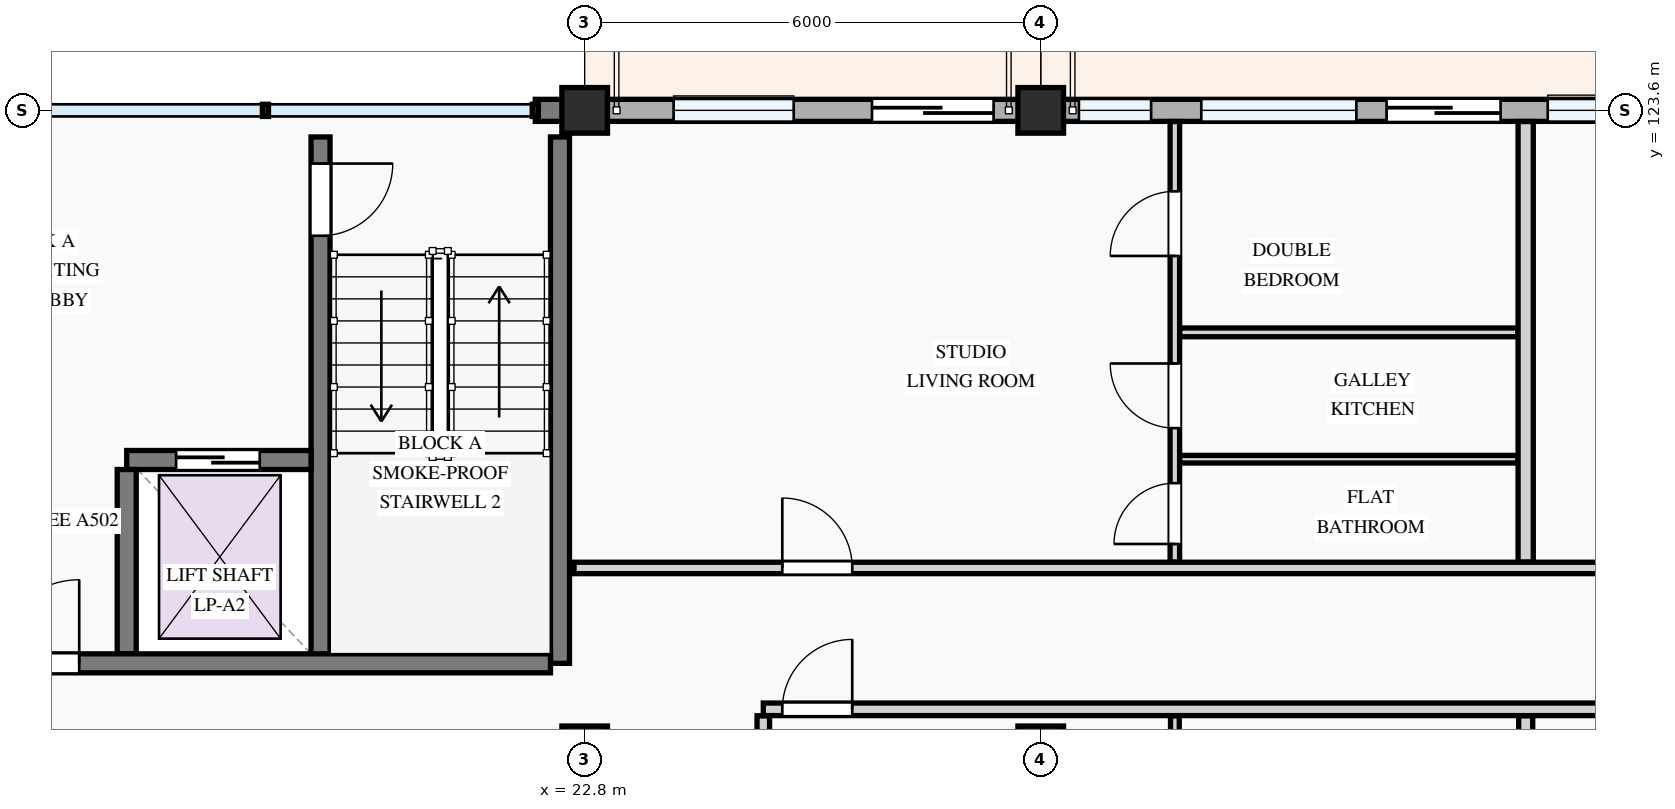
"""IFC4 building model, lengths in metres.
Left out: names, types, materials, properties, quantities, classifications, styles, units other than length and angle.
Written with IfcOpenShell. Run it as: python <this file> out.ifc"""

import sys

from ifc_helpers import new_model, si_unit, direction, frame, frame_2d, origin, origin_2d, place, context, subcontext, project, spatial, rectangle, extrude, element, fill, save


model = new_model("IFC4")
c1 = context("Model", 3, precision=1e-05, world=origin(), true_north=direction((0.0, 1.0)))
c2 = subcontext(c1, "Body", "Model", "MODEL_VIEW")
j1 = project(units=[si_unit("LENGTHUNIT", "METRE"), si_unit("PLANEANGLEUNIT", "RADIAN")], contexts=[c1])
p1 = place(None, origin())
s1 = spatial("IfcSite", under=j1, at=p1, CompositionType="ELEMENT")
p2 = place(p1, origin())
s2 = spatial("IfcBuilding", under=s1, at=p2, CompositionType="ELEMENT")
p3 = place(p2, frame((0.0, 0.0, 27.9)))
s3 = spatial("IfcBuildingStorey", under=s2, at=p3, CompositionType="ELEMENT", Elevation=27.9)
for number, where, z_axis, x_axis in (
    (1, (22.8, 115.2, 0.0), (0.0, 0.0, 1.0), (1.0, 0.0, 0.0)),
    (2, (22.8, 123.6, 0.0), (0.0, 0.0, 1.0), (1.0, 0.0, 0.0)),
    (3, (28.8, 115.2, 0.0), (0.0, 0.0, 1.0), (1.0, 0.0, 0.0)),
    (4, (28.8, 123.6, 0.0), (0.0, 0.0, 1.0), (1.0, 0.0, 0.0)),
):
    element("IfcColumn", number, at=place(p3, frame(where, z_axis=z_axis, x_axis=x_axis)), inside=s3, PredefinedType="COLUMN", context=c2, shape_type="SweptSolid", body=[
        extrude(rectangle(XDim=0.6, YDim=0.6, at=origin_2d()), origin(), (0.0, 0.0, 1.0), 3.3),
    ])
p4 = place(p3, frame((37.2, 123.6, 0.0), z_axis=(0.0, 0.0, 1.0), x_axis=(-1.0, 0.0, 0.0)))
e5 = element("IfcWall", 5, at=p4, inside=s3, PredefinedType="STANDARD", context=c2, shape_type="SweptSolid", body=[
    extrude(rectangle(XDim=8.4, YDim=0.29, at=frame_2d((4.2, 0.0))), origin(), (0.0, 0.0, 1.0), 2.345),
])
p5 = place(p4, frame((2.35, 0.0, 0.0)))
e6 = element("IfcOpeningElement", 6, at=p5, cuts=e5, PredefinedType="OPENING", context=c2, shape_type="SweptSolid", body=[
    extrude(rectangle(XDim=1.5, YDim=2.2, at=frame_2d((0.75, 1.1))), frame((0.0, 0.155, 0.0), z_axis=(0.0, -1.0, 0.0), x_axis=(1.0, 0.0, 0.0)), (0.0, 0.0, 1.0), 0.31),
])
p6 = place(p4, frame((0.48, 0.0, 0.78)))
e7 = element("IfcOpeningElement", 7, at=p6, cuts=e5, PredefinedType="OPENING", context=c2, shape_type="SweptSolid", body=[
    extrude(rectangle(XDim=1.25, YDim=1.3, at=frame_2d((0.625, 0.65))), frame((0.0, 0.155, 0.0), z_axis=(0.0, -1.0, 0.0), x_axis=(1.0, 0.0, 0.0)), (0.0, 0.0, 1.0), 0.31),
])
p7 = place(p4, frame((4.248, 0.0, 0.78)))
e8 = element("IfcOpeningElement", 8, at=p7, cuts=e5, PredefinedType="OPENING", context=c2, shape_type="SweptSolid", body=[
    extrude(rectangle(XDim=2.04, YDim=1.46, at=frame_2d((1.02, 0.73))), frame((0.0, 0.155, 0.0), z_axis=(0.0, -1.0, 0.0), x_axis=(1.0, 0.0, 0.0)), (0.0, 0.0, 1.0), 0.31),
])
p8 = place(p4, frame((6.948, 0.0, 0.78)))
e9 = element("IfcOpeningElement", 9, at=p8, cuts=e5, PredefinedType="OPENING", context=c2, shape_type="SweptSolid", body=[
    extrude(rectangle(XDim=0.95, YDim=1.15, at=frame_2d((0.475, 0.575))), frame((0.0, 0.155, 0.0), z_axis=(0.0, -1.0, 0.0), x_axis=(1.0, 0.0, 0.0)), (0.0, 0.0, 1.0), 0.31),
])
p9 = place(p3, frame((28.8, 123.6, 0.0), z_axis=(0.0, 0.0, 1.0), x_axis=(-1.0, 0.0, 0.0)))
e10 = element("IfcWall", 10, at=p9, inside=s3, PredefinedType="STANDARD", context=c2, shape_type="SweptSolid", body=[
    extrude(rectangle(XDim=6.0, YDim=0.29, at=frame_2d((3.0, 0.0))), origin(), (0.0, 0.0, 1.0), 2.445),
])
p10 = place(p9, frame((0.62, 0.0, 0.0)))
e11 = element("IfcOpeningElement", 11, at=p10, cuts=e10, PredefinedType="OPENING", context=c2, shape_type="SweptSolid", body=[
    extrude(rectangle(XDim=1.6, YDim=2.2, at=frame_2d((0.8, 1.1))), frame((0.0, 0.155, 0.0), z_axis=(0.0, -1.0, 0.0), x_axis=(1.0, 0.0, 0.0)), (0.0, 0.0, 1.0), 0.31),
])
p11 = place(p9, frame((3.25, 0.0, 0.78)))
e12 = element("IfcOpeningElement", 12, at=p11, cuts=e10, PredefinedType="OPENING", context=c2, shape_type="SweptSolid", body=[
    extrude(rectangle(XDim=1.58, YDim=1.48, at=frame_2d((0.79, 0.74))), frame((0.0, 0.155, 0.0), z_axis=(0.0, -1.0, 0.0), x_axis=(1.0, 0.0, 0.0)), (0.0, 0.0, 1.0), 0.31),
])
p12 = place(p3, frame((22.8, 123.6, 0.0), z_axis=(0.0, 0.0, 1.0), x_axis=(-1.0, 0.0, 0.0)))
e13 = element("IfcWall", 13, at=p12, inside=s3, PredefinedType="STANDARD", context=c2, shape_type="SweptSolid", body=[
    extrude(rectangle(XDim=0.65, YDim=0.29, at=frame_2d((0.325, 0.0))), origin(), (0.0, 0.0, 1.0), 3.04),
])
p13 = place(p3, frame((22.475, 123.25, 0.0), z_axis=(0.0, 0.0, 1.0), x_axis=(0.0, -1.0, 0.0)))
e14 = element("IfcWall", 14, at=p13, inside=s3, PredefinedType="SHEAR", context=c2, shape_type="SweptSolid", body=[
    extrude(rectangle(XDim=6.925, YDim=0.25, at=frame_2d((3.462, 0.0))), origin(), (0.0, 0.0, 1.0), 3.0),
])
p14 = place(p3, frame((19.325, 123.25, 0.0), z_axis=(0.0, 0.0, 1.0), x_axis=(0.0, -1.0, 0.0)))
e15 = element("IfcWall", 15, at=p14, inside=s3, PredefinedType="SHEAR", context=c2, shape_type="SweptSolid", body=[
    extrude(rectangle(XDim=6.925, YDim=0.25, at=frame_2d((3.462, 0.0))), origin(), (0.0, 0.0, 1.0), 3.0),
])
p15 = place(p14, frame((0.35, 0.0, 0.0)))
e16 = element("IfcOpeningElement", 16, at=p15, cuts=e15, PredefinedType="OPENING", context=c2, shape_type="SweptSolid", body=[
    extrude(rectangle(XDim=0.95, YDim=2.1, at=frame_2d((0.475, 1.05))), frame((0.0, 0.135, 0.0), z_axis=(0.0, -1.0, 0.0), x_axis=(1.0, 0.0, 0.0)), (0.0, 0.0, 1.0), 0.27),
])
p16 = place(p3, frame((16.775, 119.0, 0.0), z_axis=(0.0, 0.0, 1.0), x_axis=(1.0, 0.0, 0.0)))
e17 = element("IfcWall", 17, at=p16, inside=s3, PredefinedType="SHEAR", context=c2, shape_type="SweptSolid", body=[
    extrude(rectangle(XDim=2.425, YDim=0.25, at=frame_2d((1.212, 0.0))), origin(), (0.0, 0.0, 1.0), 3.0),
])
p17 = place(p16, frame((0.65, 0.0, 0.0)))
e18 = element("IfcOpeningElement", 18, at=p17, cuts=e17, PredefinedType="OPENING", context=c2, shape_type="SweptSolid", body=[
    extrude(rectangle(XDim=1.1, YDim=2.15, at=frame_2d((0.55, 1.075))), frame((0.0, 0.135, 0.0), z_axis=(0.0, -1.0, 0.0), x_axis=(1.0, 0.0, 0.0)), (0.0, 0.0, 1.0), 0.27),
])
p18 = place(p3, frame((16.775, 118.875, 0.0), z_axis=(0.0, 0.0, 1.0), x_axis=(0.0, -1.0, 0.0)))
e19 = element("IfcWall", 19, at=p18, inside=s3, PredefinedType="SHEAR", context=c2, shape_type="SweptSolid", body=[
    extrude(rectangle(XDim=2.425, YDim=0.25, at=frame_2d((1.212, 0.0))), origin(), (0.0, 0.0, 1.0), 3.0),
])
p19 = place(p3, frame((8.85, 116.325, 0.0), z_axis=(0.0, 0.0, 1.0), x_axis=(1.0, 0.0, 0.0)))
e20 = element("IfcWall", 20, at=p19, inside=s3, PredefinedType="SHEAR", context=c2, shape_type="SweptSolid", body=[
    extrude(rectangle(XDim=13.5, YDim=0.25, at=frame_2d((6.75, 0.0))), origin(), (0.0, 0.0, 1.0), 3.0),
])
p20 = place(p19, frame((6.2, 0.0, 0.0)))
e21 = element("IfcOpeningElement", 21, at=p20, cuts=e20, PredefinedType="OPENING", context=c2, shape_type="SweptSolid", body=[
    extrude(rectangle(XDim=1.1, YDim=2.15, at=frame_2d((0.55, 1.075))), frame((0.0, 0.135, 0.0), z_axis=(0.0, -1.0, 0.0), x_axis=(1.0, 0.0, 0.0)), (0.0, 0.0, 1.0), 0.27),
])
p21 = place(p3, frame((25.15, 109.347, 0.0), z_axis=(0.0, 0.0, 1.0), x_axis=(0.0, 1.0, 0.0)))
e22 = element("IfcWall", 22, at=p21, inside=s3, PredefinedType="PARTITIONING", context=c2, shape_type="SweptSolid", body=[
    extrude(rectangle(XDim=6.289, YDim=0.165, at=frame_2d((3.144, 0.0))), origin(), (0.0, 0.0, 1.0), 3.0),
])
p22 = place(p3, frame((30.565, 109.347, 0.0), z_axis=(0.0, 0.0, 1.0), x_axis=(0.0, 1.0, 0.0)))
e23 = element("IfcWall", 23, at=p22, inside=s3, PredefinedType="PARTITIONING", context=c2, shape_type="SweptSolid", body=[
    extrude(rectangle(XDim=6.289, YDim=0.115, at=frame_2d((3.144, 0.0))), origin(), (0.0, 0.0, 1.0), 3.0),
])
p23 = place(p22, frame((1.038, 0.0, 0.0)))
e24 = element("IfcOpeningElement", 24, at=p23, cuts=e23, PredefinedType="OPENING", context=c2, shape_type="SweptSolid", body=[
    extrude(rectangle(XDim=0.85, YDim=2.1, at=frame_2d((0.425, 1.05))), frame((0.0, 0.067, 0.0), z_axis=(0.0, -1.0, 0.0), x_axis=(1.0, 0.0, 0.0)), (0.0, 0.0, 1.0), 0.135),
])
p24 = place(p22, frame((3.493, 0.0, 0.0)))
e25 = element("IfcOpeningElement", 25, at=p24, cuts=e23, PredefinedType="OPENING", context=c2, shape_type="SweptSolid", body=[
    extrude(rectangle(XDim=0.85, YDim=2.1, at=frame_2d((0.425, 1.05))), frame((0.0, 0.067, 0.0), z_axis=(0.0, -1.0, 0.0), x_axis=(1.0, 0.0, 0.0)), (0.0, 0.0, 1.0), 0.135),
])
p25 = place(p22, frame((5.198, 0.0, 0.0)))
e26 = element("IfcOpeningElement", 26, at=p25, cuts=e23, PredefinedType="OPENING", context=c2, shape_type="SweptSolid", body=[
    extrude(rectangle(XDim=0.8, YDim=2.1, at=frame_2d((0.4, 1.05))), frame((0.0, 0.067, 0.0), z_axis=(0.0, -1.0, 0.0), x_axis=(1.0, 0.0, 0.0)), (0.0, 0.0, 1.0), 0.135),
])
p26 = place(p3, frame((30.564, 117.657, 0.0), z_axis=(0.0, 0.0, 1.0), x_axis=(0.0, 1.0, 0.0)))
e27 = element("IfcWall", 27, at=p26, inside=s3, PredefinedType="PARTITIONING", context=c2, shape_type="SweptSolid", body=[
    extrude(rectangle(XDim=5.796, YDim=0.125, at=frame_2d((2.898, 0.0))), origin(), (0.0, 0.0, 1.0), 3.0),
])
p27 = place(p26, frame((0.238, 0.0, 0.0)))
e28 = element("IfcOpeningElement", 28, at=p27, cuts=e27, PredefinedType="OPENING", context=c2, shape_type="SweptSolid", body=[
    extrude(rectangle(XDim=0.8, YDim=2.1, at=frame_2d((0.4, 1.05))), frame((0.0, 0.073, 0.0), z_axis=(0.0, -1.0, 0.0), x_axis=(1.0, 0.0, 0.0)), (0.0, 0.0, 1.0), 0.145),
])
p28 = place(p26, frame((1.763, 0.0, 0.0)))
e29 = element("IfcOpeningElement", 29, at=p28, cuts=e27, PredefinedType="OPENING", context=c2, shape_type="SweptSolid", body=[
    extrude(rectangle(XDim=0.85, YDim=2.1, at=frame_2d((0.425, 1.05))), frame((0.0, 0.073, 0.0), z_axis=(0.0, -1.0, 0.0), x_axis=(1.0, 0.0, 0.0)), (0.0, 0.0, 1.0), 0.145),
])
p29 = place(p26, frame((4.028, 0.0, 0.0)))
e30 = element("IfcOpeningElement", 30, at=p29, cuts=e27, PredefinedType="OPENING", context=c2, shape_type="SweptSolid", body=[
    extrude(rectangle(XDim=0.85, YDim=2.1, at=frame_2d((0.425, 1.05))), frame((0.0, 0.073, 0.0), z_axis=(0.0, -1.0, 0.0), x_axis=(1.0, 0.0, 0.0)), (0.0, 0.0, 1.0), 0.145),
])
p30 = place(p3, frame((30.629, 120.679, 0.0), z_axis=(0.0, 0.0, 1.0), x_axis=(1.0, 0.0, 0.0)))
e31 = element("IfcWall", 31, at=p30, inside=s3, PredefinedType="PARTITIONING", context=c2, shape_type="SweptSolid", body=[
    extrude(rectangle(XDim=4.449, YDim=0.115, at=frame_2d((2.225, 0.0))), origin(), (0.0, 0.0, 1.0), 3.0),
])
p31 = place(p3, frame((30.629, 119.01, 0.0), z_axis=(0.0, 0.0, 1.0), x_axis=(1.0, 0.0, 0.0)))
e32 = element("IfcWall", 32, at=p31, inside=s3, PredefinedType="PARTITIONING", context=c2, shape_type="SweptSolid", body=[
    extrude(rectangle(XDim=4.449, YDim=0.1, at=frame_2d((2.225, 0.0))), origin(), (0.0, 0.0, 1.0), 3.0),
])
p32 = place(p3, frame((35.18, 109.347, 0.0), z_axis=(0.0, 0.0, 1.0), x_axis=(0.0, 1.0, 0.0)))
e33 = element("IfcWall", 33, at=p32, inside=s3, PredefinedType="PARTITIONING", context=c2, shape_type="SweptSolid", body=[
    extrude(rectangle(XDim=6.289, YDim=0.185, at=frame_2d((3.144, 0.0))), origin(), (0.0, 0.0, 1.0), 3.0),
])
p33 = place(p3, frame((35.18, 117.657, 0.0), z_axis=(0.0, 0.0, 1.0), x_axis=(0.0, 1.0, 0.0)))
e34 = element("IfcWall", 34, at=p33, inside=s3, PredefinedType="PARTITIONING", context=c2, shape_type="SweptSolid", body=[
    extrude(rectangle(XDim=5.796, YDim=0.2, at=frame_2d((2.898, 0.0))), origin(), (0.0, 0.0, 1.0), 3.0),
])
p34 = place(p3, frame((25.15, 115.72, 0.0), z_axis=(0.0, 0.0, 1.0), x_axis=(1.0, 0.0, 0.0)))
e35 = element("IfcWall", 35, at=p34, inside=s3, PredefinedType="PARTITIONING", context=c2, shape_type="SweptSolid", body=[
    extrude(rectangle(XDim=26.303, YDim=0.165, at=frame_2d((13.151, 0.0))), origin(), (0.0, 0.0, 1.0), 3.0),
])
p35 = place(p34, frame((0.25, 0.0, 0.0)))
e36 = element("IfcOpeningElement", 36, at=p35, cuts=e35, PredefinedType="OPENING", context=c2, shape_type="SweptSolid", body=[
    extrude(rectangle(XDim=0.92, YDim=2.1, at=frame_2d((0.46, 1.05))), frame((0.0, 0.093, 0.0), z_axis=(0.0, -1.0, 0.0), x_axis=(1.0, 0.0, 0.0)), (0.0, 0.0, 1.0), 0.185),
])
p36 = place(p34, frame((13.72, 0.0, 0.0)))
e37 = element("IfcOpeningElement", 37, at=p36, cuts=e35, PredefinedType="OPENING", context=c2, shape_type="SweptSolid", body=[
    extrude(rectangle(XDim=0.92, YDim=2.1, at=frame_2d((0.46, 1.05))), frame((0.0, 0.093, 0.0), z_axis=(0.0, -1.0, 0.0), x_axis=(1.0, 0.0, 0.0)), (0.0, 0.0, 1.0), 0.185),
])
p37 = place(p34, frame((21.786, 0.0, 0.0)))
e38 = element("IfcOpeningElement", 38, at=p37, cuts=e35, PredefinedType="OPENING", context=c2, shape_type="SweptSolid", body=[
    extrude(rectangle(XDim=0.96, YDim=2.12, at=frame_2d((0.48, 1.06))), frame((0.0, 0.093, 0.0), z_axis=(0.0, -1.0, 0.0), x_axis=(1.0, 0.0, 0.0)), (0.0, 0.0, 1.0), 0.185),
])
p38 = place(p3, frame((22.66, 117.58, 0.0), z_axis=(0.0, 0.0, 1.0), x_axis=(1.0, 0.0, 0.0)))
e39 = element("IfcWall", 39, at=p38, inside=s3, PredefinedType="PARTITIONING", context=c2, shape_type="SweptSolid", body=[
    extrude(rectangle(XDim=28.793, YDim=0.15, at=frame_2d((14.396, 0.0))), origin(), (0.0, 0.0, 1.0), 3.0),
])
p39 = place(p38, frame((2.74, 0.0, 0.0)))
e40 = element("IfcOpeningElement", 40, at=p39, cuts=e39, PredefinedType="OPENING", context=c2, shape_type="SweptSolid", body=[
    extrude(rectangle(XDim=0.92, YDim=2.1, at=frame_2d((0.46, 1.05))), frame((0.0, 0.085, 0.0), z_axis=(0.0, -1.0, 0.0), x_axis=(1.0, 0.0, 0.0)), (0.0, 0.0, 1.0), 0.17),
])
p40 = place(p38, frame((16.014, 0.0, 0.0)))
e41 = element("IfcOpeningElement", 41, at=p40, cuts=e39, PredefinedType="OPENING", context=c2, shape_type="SweptSolid", body=[
    extrude(rectangle(XDim=0.92, YDim=2.1, at=frame_2d((0.46, 1.05))), frame((0.0, 0.085, 0.0), z_axis=(0.0, -1.0, 0.0), x_axis=(1.0, 0.0, 0.0)), (0.0, 0.0, 1.0), 0.17),
])
p41 = place(p38, frame((24.259, 0.0, 0.0)))
e42 = element("IfcOpeningElement", 42, at=p41, cuts=e39, PredefinedType="OPENING", context=c2, shape_type="SweptSolid", body=[
    extrude(rectangle(XDim=0.92, YDim=2.1, at=frame_2d((0.46, 1.05))), frame((0.0, 0.085, 0.0), z_axis=(0.0, -1.0, 0.0), x_axis=(1.0, 0.0, 0.0)), (0.0, 0.0, 1.0), 0.17),
])
p42 = place(p5, frame((1.5, 0.0, 0.0), z_axis=(0.0, 0.0, 1.0), x_axis=(-1.0, 0.0, 0.0)))
e43 = element("IfcDoor", 43, at=p42, inside=s3, OperationType="SLIDING_TO_RIGHT", PredefinedType="DOOR", context=c2, shape_type="SweptSolid", body=[
    extrude(rectangle(XDim=1.5, YDim=2.2, at=frame_2d((0.75, 1.1))), frame((0.0, 0.025, 0.0), z_axis=(0.0, -1.0, 0.0), x_axis=(1.0, 0.0, 0.0)), (0.0, 0.0, 1.0), 0.05),
])
fill(e6, e43)
p43 = place(p6, origin())
e44 = element("IfcWindow", 44, at=p43, inside=s3, PartitioningType="SINGLE_PANEL", PredefinedType="WINDOW", context=c2, shape_type="SweptSolid", body=[
    extrude(rectangle(XDim=1.25, YDim=1.3, at=frame_2d((0.625, 0.65))), frame((0.0, 0.03, 0.0), z_axis=(0.0, -1.0, 0.0), x_axis=(1.0, 0.0, 0.0)), (0.0, 0.0, 1.0), 0.06),
])
fill(e7, e44)
p44 = place(p7, origin())
e45 = element("IfcWindow", 45, at=p44, inside=s3, PartitioningType="DOUBLE_PANEL_VERTICAL", PredefinedType="WINDOW", context=c2, shape_type="SweptSolid", body=[
    extrude(rectangle(XDim=2.04, YDim=1.46, at=frame_2d((1.02, 0.73))), frame((0.0, 0.03, 0.0), z_axis=(0.0, -1.0, 0.0), x_axis=(1.0, 0.0, 0.0)), (0.0, 0.0, 1.0), 0.06),
])
fill(e8, e45)
p45 = place(p8, origin())
e46 = element("IfcWindow", 46, at=p45, inside=s3, PartitioningType="SINGLE_PANEL", PredefinedType="WINDOW", context=c2, shape_type="SweptSolid", body=[
    extrude(rectangle(XDim=0.95, YDim=1.15, at=frame_2d((0.475, 0.575))), frame((0.0, 0.03, 0.0), z_axis=(0.0, -1.0, 0.0), x_axis=(1.0, 0.0, 0.0)), (0.0, 0.0, 1.0), 0.06),
])
fill(e9, e46)
p46 = place(p10, frame((1.6, 0.0, 0.0), z_axis=(0.0, 0.0, 1.0), x_axis=(-1.0, 0.0, 0.0)))
e47 = element("IfcDoor", 47, at=p46, inside=s3, OperationType="SLIDING_TO_LEFT", PredefinedType="DOOR", context=c2, shape_type="SweptSolid", body=[
    extrude(rectangle(XDim=1.6, YDim=2.2, at=frame_2d((0.8, 1.1))), frame((0.0, 0.025, 0.0), z_axis=(0.0, -1.0, 0.0), x_axis=(1.0, 0.0, 0.0)), (0.0, 0.0, 1.0), 0.05),
])
fill(e11, e47)
p47 = place(p11, origin())
e48 = element("IfcWindow", 48, at=p47, inside=s3, PartitioningType="SINGLE_PANEL", PredefinedType="WINDOW", context=c2, shape_type="SweptSolid", body=[
    extrude(rectangle(XDim=1.58, YDim=1.48, at=frame_2d((0.79, 0.74))), frame((0.0, 0.03, 0.0), z_axis=(0.0, -1.0, 0.0), x_axis=(1.0, 0.0, 0.0)), (0.0, 0.0, 1.0), 0.06),
])
fill(e12, e48)
p48 = place(p15, origin())
e49 = element("IfcDoor", 49, at=p48, inside=s3, OperationType="SINGLE_SWING_LEFT", PredefinedType="DOOR", context=c2, shape_type="SweptSolid", body=[
    extrude(rectangle(XDim=0.95, YDim=2.1, at=frame_2d((0.475, 1.05))), frame((0.0, 0.025, 0.0), z_axis=(0.0, -1.0, 0.0), x_axis=(1.0, 0.0, 0.0)), (0.0, 0.0, 1.0), 0.05),
])
fill(e16, e49)
p49 = place(p17, origin())
e50 = element("IfcDoor", 50, at=p49, inside=s3, OperationType="SLIDING_TO_LEFT", PredefinedType="DOOR", context=c2, shape_type="SweptSolid", body=[
    extrude(rectangle(XDim=1.1, YDim=2.15, at=frame_2d((0.55, 1.075))), frame((0.0, 0.025, 0.0), z_axis=(0.0, -1.0, 0.0), x_axis=(1.0, 0.0, 0.0)), (0.0, 0.0, 1.0), 0.05),
])
fill(e18, e50)
p50 = place(p20, origin())
e51 = element("IfcDoor", 51, at=p50, inside=s3, OperationType="SINGLE_SWING_RIGHT", PredefinedType="DOOR", context=c2, shape_type="SweptSolid", body=[
    extrude(rectangle(XDim=1.1, YDim=2.15, at=frame_2d((0.55, 1.075))), frame((0.0, 0.025, 0.0), z_axis=(0.0, -1.0, 0.0), x_axis=(1.0, 0.0, 0.0)), (0.0, 0.0, 1.0), 0.05),
])
fill(e21, e51)
p51 = place(p27, origin())
e52 = element("IfcDoor", 52, at=p51, inside=s3, OperationType="SINGLE_SWING_LEFT", PredefinedType="DOOR", context=c2, shape_type="SweptSolid", body=[
    extrude(rectangle(XDim=0.8, YDim=2.1, at=frame_2d((0.4, 1.05))), frame((0.0, 0.025, 0.0), z_axis=(0.0, -1.0, 0.0), x_axis=(1.0, 0.0, 0.0)), (0.0, 0.0, 1.0), 0.05),
])
fill(e28, e52)
p52 = place(p28, origin())
e53 = element("IfcDoor", 53, at=p52, inside=s3, OperationType="SINGLE_SWING_RIGHT", PredefinedType="DOOR", context=c2, shape_type="SweptSolid", body=[
    extrude(rectangle(XDim=0.85, YDim=2.1, at=frame_2d((0.425, 1.05))), frame((0.0, 0.025, 0.0), z_axis=(0.0, -1.0, 0.0), x_axis=(1.0, 0.0, 0.0)), (0.0, 0.0, 1.0), 0.05),
])
fill(e29, e53)
p53 = place(p29, origin())
e54 = element("IfcDoor", 54, at=p53, inside=s3, OperationType="SINGLE_SWING_LEFT", PredefinedType="DOOR", context=c2, shape_type="SweptSolid", body=[
    extrude(rectangle(XDim=0.85, YDim=2.1, at=frame_2d((0.425, 1.05))), frame((0.0, 0.025, 0.0), z_axis=(0.0, -1.0, 0.0), x_axis=(1.0, 0.0, 0.0)), (0.0, 0.0, 1.0), 0.05),
])
fill(e30, e54)
p54 = place(p35, origin())
e55 = element("IfcDoor", 55, at=p54, inside=s3, OperationType="SINGLE_SWING_RIGHT", PredefinedType="DOOR", context=c2, shape_type="SweptSolid", body=[
    extrude(rectangle(XDim=0.92, YDim=2.1, at=frame_2d((0.46, 1.05))), frame((0.0, 0.025, 0.0), z_axis=(0.0, -1.0, 0.0), x_axis=(1.0, 0.0, 0.0)), (0.0, 0.0, 1.0), 0.05),
])
fill(e36, e55)
p55 = place(p39, origin())
e56 = element("IfcDoor", 56, at=p55, inside=s3, OperationType="SINGLE_SWING_LEFT", PredefinedType="DOOR", context=c2, shape_type="SweptSolid", body=[
    extrude(rectangle(XDim=0.92, YDim=2.1, at=frame_2d((0.46, 1.05))), frame((0.0, 0.025, 0.0), z_axis=(0.0, -1.0, 0.0), x_axis=(1.0, 0.0, 0.0)), (0.0, 0.0, 1.0), 0.05),
])
fill(e40, e56)
save(model, sys.argv[1])
